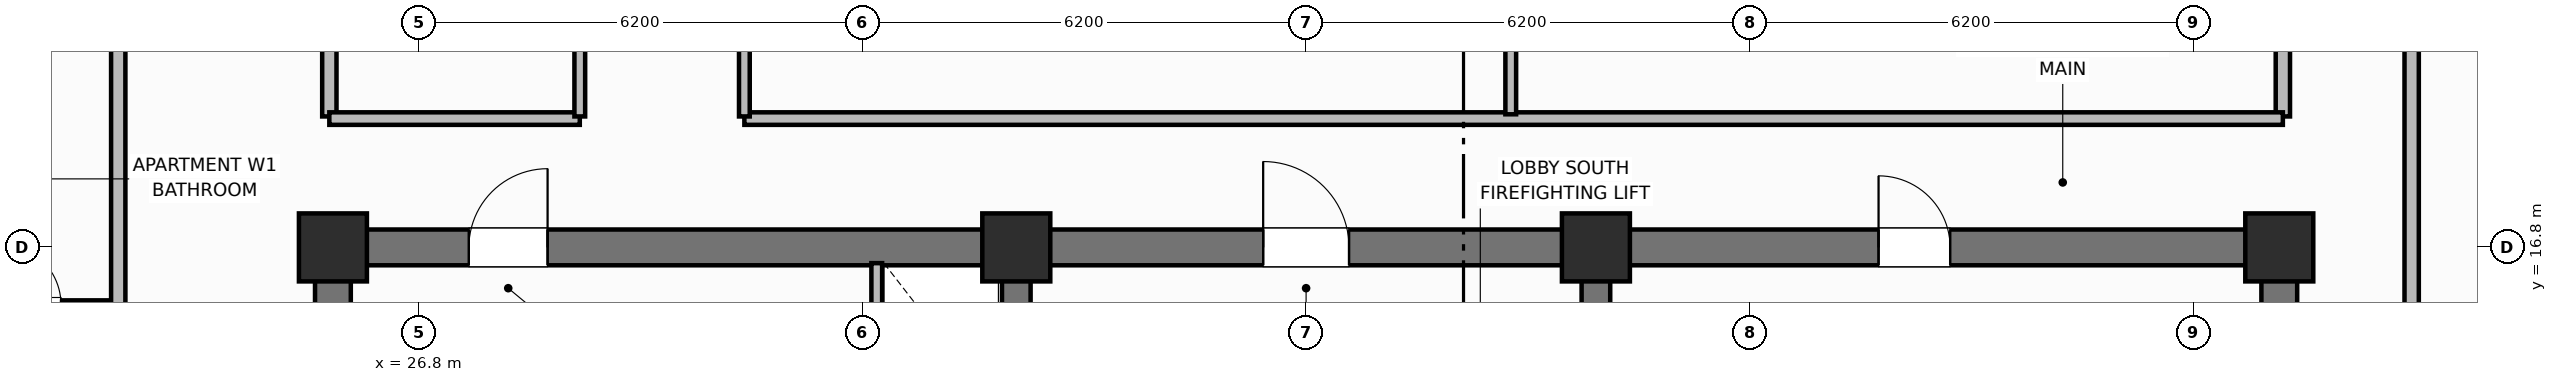
"""IFC4 building model, lengths in metres.
Left out: names, types, materials, properties, quantities, classifications, styles, units other than length and angle.
Written with IfcOpenShell. Run it as: python <this file> out.ifc"""

import sys

from ifc_helpers import new_model, si_unit, direction, frame, frame_2d, origin, origin_2d, place, context, subcontext, project, spatial, rectangle, extrude, element, fill, save


model = new_model("IFC4")
c1 = context("Model", 3, precision=1e-05, world=origin(), true_north=direction((0.0, 1.0)))
c2 = subcontext(c1, "Body", "Model", "MODEL_VIEW")
j1 = project(units=[si_unit("LENGTHUNIT", "METRE"), si_unit("PLANEANGLEUNIT", "RADIAN")], contexts=[c1])
p1 = place(None, origin())
s1 = spatial("IfcSite", under=j1, at=p1, CompositionType="ELEMENT")
p2 = place(p1, origin())
s2 = spatial("IfcBuilding", under=s1, at=p2, CompositionType="ELEMENT")
p3 = place(p2, frame((0.0, 0.0, 177.4)))
s3 = spatial("IfcBuildingStorey", under=s2, at=p3, CompositionType="ELEMENT", Elevation=177.4)
for number, where, z_axis, x_axis in (
    (1, (25.6, 10.85, 0.0), (0.0, 0.0, 1.0), (0.0, 1.0, 0.0)),
    (2, (52.8, 10.85, 0.0), (0.0, 0.0, 1.0), (0.0, 1.0, 0.0)),
):
    element("IfcWall", number, at=place(p3, frame(where, z_axis=z_axis, x_axis=x_axis)), inside=s3, PredefinedType="SHEAR", context=c2, shape_type="SweptSolid", body=[
        extrude(rectangle(XDim=5.7, YDim=0.5, at=frame_2d((2.85, 0.0))), origin(), (0.0, 0.0, 1.0), 3.7),
    ])
p4 = place(p3, frame((25.6, 16.8, 0.0), z_axis=(0.0, 0.0, 1.0), x_axis=(1.0, 0.0, 0.0)))
e3 = element("IfcWall", 3, at=p4, inside=s3, PredefinedType="SHEAR", context=c2, shape_type="SweptSolid", body=[
    extrude(rectangle(XDim=27.2, YDim=0.5, at=frame_2d((13.6, 0.0))), origin(), (0.0, 0.0, 1.0), 3.7),
])
p5 = place(p4, frame((1.9, 0.0, 0.0)))
e4 = element("IfcOpeningElement", 4, at=p5, cuts=e3, PredefinedType="OPENING", context=c2, shape_type="SweptSolid", body=[
    extrude(rectangle(XDim=1.1, YDim=2.15, at=frame_2d((0.55, 1.075))), frame((0.0, 0.26, 0.0), z_axis=(0.0, -1.0, 0.0), x_axis=(1.0, 0.0, 0.0)), (0.0, 0.0, 1.0), 0.52),
])
p6 = place(p4, frame((13.0, 0.0, 0.0)))
e5 = element("IfcOpeningElement", 5, at=p6, cuts=e3, PredefinedType="OPENING", context=c2, shape_type="SweptSolid", body=[
    extrude(rectangle(XDim=1.2, YDim=2.15, at=frame_2d((0.6, 1.075))), frame((0.0, 0.26, 0.0), z_axis=(0.0, -1.0, 0.0), x_axis=(1.0, 0.0, 0.0)), (0.0, 0.0, 1.0), 0.52),
])
p7 = place(p4, frame((21.6, 0.0, 0.0)))
e6 = element("IfcOpeningElement", 6, at=p7, cuts=e3, PredefinedType="OPENING", context=c2, shape_type="SweptSolid", body=[
    extrude(rectangle(XDim=1.0, YDim=2.15, at=frame_2d((0.5, 1.075))), frame((0.0, 0.26, 0.0), z_axis=(0.0, -1.0, 0.0), x_axis=(1.0, 0.0, 0.0)), (0.0, 0.0, 1.0), 0.52),
])
for number, where, z_axis, x_axis in (
    (7, (35.15, 10.85, 0.0), (0.0, 0.0, 1.0), (0.0, 1.0, 0.0)),
    (8, (43.25, 10.85, 0.0), (0.0, 0.0, 1.0), (0.0, 1.0, 0.0)),
):
    element("IfcWall", number, at=place(p3, frame(where, z_axis=z_axis, x_axis=x_axis)), inside=s3, PredefinedType="SHEAR", context=c2, shape_type="SweptSolid", body=[
        extrude(rectangle(XDim=5.7, YDim=0.4, at=frame_2d((2.85, 0.0))), origin(), (0.0, 0.0, 1.0), 3.7),
    ])
for number, where, z_axis, x_axis in (
    (9, (25.6, 16.8, 0.0), (0.0, 0.0, 1.0), (1.0, 0.0, 0.0)),
    (10, (35.15, 16.8, 0.0), (0.0, 0.0, 1.0), (1.0, 0.0, 0.0)),
    (11, (43.25, 16.8, 0.0), (0.0, 0.0, 1.0), (1.0, 0.0, 0.0)),
    (12, (52.8, 16.8, 0.0), (0.0, 0.0, 1.0), (1.0, 0.0, 0.0)),
):
    element("IfcColumn", number, at=place(p3, frame(where, z_axis=z_axis, x_axis=x_axis)), inside=s3, PredefinedType="COLUMN", context=c2, shape_type="SweptSolid", body=[
        extrude(rectangle(XDim=0.95, YDim=0.95, at=origin_2d()), origin(), (0.0, 0.0, 1.0), 3.7),
    ])
p8 = place(p3, frame((33.2, 14.5, 0.0), z_axis=(0.0, 0.0, 1.0), x_axis=(0.0, 1.0, 0.0)))
e13 = element("IfcWall", 13, at=p8, inside=s3, PredefinedType="PARTITIONING", context=c2, shape_type="SweptSolid", body=[
    extrude(rectangle(XDim=2.08, YDim=0.15, at=frame_2d((1.04, 0.0))), origin(), (0.0, 0.0, 1.0), 2.55),
])
p9 = place(p8, frame((0.55, 0.0, 0.0)))
e14 = element("IfcOpeningElement", 14, at=p9, cuts=e13, PredefinedType="OPENING", context=c2, shape_type="SweptSolid", body=[
    extrude(rectangle(XDim=0.85, YDim=2.05, at=frame_2d((0.425, 1.025))), frame((0.0, 0.085, 0.0), z_axis=(0.0, -1.0, 0.0), x_axis=(1.0, 0.0, 0.0)), (0.0, 0.0, 1.0), 0.17),
])
for number, where, z_axis, x_axis in (
    (15, (25.55, 18.63, 0.0), (0.0, 0.0, 1.0), (0.0, 1.0, 0.0)),
    (16, (52.85, 18.63, 0.0), (0.0, 0.0, 1.0), (0.0, 1.0, 0.0)),
):
    element("IfcWall", number, at=place(p3, frame(where, z_axis=z_axis, x_axis=x_axis)), inside=s3, PredefinedType="PARTITIONING", context=c2, shape_type="SweptSolid", body=[
        extrude(rectangle(XDim=19.14, YDim=0.2, at=frame_2d((9.57, 0.0))), origin(), (0.0, 0.0, 1.0), 2.55),
    ])
p10 = place(p3, frame((25.55, 18.6, 0.0), z_axis=(0.0, 0.0, 1.0), x_axis=(1.0, 0.0, 0.0)))
e17 = element("IfcWall", 17, at=p10, inside=s3, PredefinedType="PARTITIONING", context=c2, shape_type="SweptSolid", body=[
    extrude(rectangle(XDim=3.5, YDim=0.175, at=frame_2d((1.75, 0.0))), origin(), (0.0, 0.0, 1.0), 2.55),
])
p11 = place(p3, frame((31.35, 18.6, 0.0), z_axis=(0.0, 0.0, 1.0), x_axis=(1.0, 0.0, 0.0)))
e18 = element("IfcWall", 18, at=p11, inside=s3, PredefinedType="PARTITIONING", context=c2, shape_type="SweptSolid", body=[
    extrude(rectangle(XDim=21.5, YDim=0.175, at=frame_2d((10.75, 0.0))), origin(), (0.0, 0.0, 1.0), 2.55),
])
p12 = place(p3, frame((42.06, 18.66, 0.0), z_axis=(0.0, 0.0, 1.0), x_axis=(0.0, 1.0, 0.0)))
e19 = element("IfcWall", 19, at=p12, inside=s3, PredefinedType="PARTITIONING", context=c2, shape_type="SweptSolid", body=[
    extrude(rectangle(XDim=19.08, YDim=0.15, at=frame_2d((9.54, 0.0))), origin(), (0.0, 0.0, 1.0), 2.55),
])
p13 = place(p12, frame((6.5, 0.0, 0.0)))
e20 = element("IfcOpeningElement", 20, at=p13, cuts=e19, PredefinedType="OPENING", context=c2, shape_type="SweptSolid", body=[
    extrude(rectangle(XDim=1.0, YDim=2.15, at=frame_2d((0.5, 1.075))), frame((0.0, 0.085, 0.0), z_axis=(0.0, -1.0, 0.0), x_axis=(1.0, 0.0, 0.0)), (0.0, 0.0, 1.0), 0.17),
])
p14 = place(p3, frame((29.05, 18.63, 0.0), z_axis=(0.0, 0.0, 1.0), x_axis=(0.0, 1.0, 0.0)))
e21 = element("IfcWall", 21, at=p14, inside=s3, PredefinedType="PARTITIONING", context=c2, shape_type="SweptSolid", body=[
    extrude(rectangle(XDim=19.14, YDim=0.15, at=frame_2d((9.57, 0.0))), origin(), (0.0, 0.0, 1.0), 2.55),
])
p15 = place(p14, frame((5.5, 0.0, 0.0)))
e22 = element("IfcOpeningElement", 22, at=p15, cuts=e21, PredefinedType="OPENING", context=c2, shape_type="SweptSolid", body=[
    extrude(rectangle(XDim=1.0, YDim=2.15, at=frame_2d((0.5, 1.075))), frame((0.0, 0.085, 0.0), z_axis=(0.0, -1.0, 0.0), x_axis=(1.0, 0.0, 0.0)), (0.0, 0.0, 1.0), 0.17),
])
p16 = place(p3, frame((31.35, 18.63, 0.0), z_axis=(0.0, 0.0, 1.0), x_axis=(0.0, 1.0, 0.0)))
e23 = element("IfcWall", 23, at=p16, inside=s3, PredefinedType="PARTITIONING", context=c2, shape_type="SweptSolid", body=[
    extrude(rectangle(XDim=19.14, YDim=0.15, at=frame_2d((9.57, 0.0))), origin(), (0.0, 0.0, 1.0), 2.55),
])
p17 = place(p16, frame((5.5, 0.0, 0.0)))
e24 = element("IfcOpeningElement", 24, at=p17, cuts=e23, PredefinedType="OPENING", context=c2, shape_type="SweptSolid", body=[
    extrude(rectangle(XDim=1.0, YDim=2.15, at=frame_2d((0.5, 1.075))), frame((0.0, 0.085, 0.0), z_axis=(0.0, -1.0, 0.0), x_axis=(1.0, 0.0, 0.0)), (0.0, 0.0, 1.0), 0.17),
])
p18 = place(p3, frame((20.35, 16.0, 0.0), z_axis=(0.0, 0.0, 1.0), x_axis=(1.0, 0.0, 0.0)))
e25 = element("IfcWall", 25, at=p18, inside=s3, PredefinedType="PARTITIONING", context=c2, shape_type="SweptSolid", body=[
    extrude(rectangle(XDim=2.25, YDim=0.12, at=frame_2d((1.125, 0.0))), origin(), (0.0, 0.0, 1.0), 2.55),
])
p19 = place(p18, frame((0.6, 0.0, 0.0)))
e26 = element("IfcOpeningElement", 26, at=p19, cuts=e25, PredefinedType="OPENING", context=c2, shape_type="SweptSolid", body=[
    extrude(rectangle(XDim=0.85, YDim=2.1, at=frame_2d((0.425, 1.05))), frame((0.0, 0.07, 0.0), z_axis=(0.0, -1.0, 0.0), x_axis=(1.0, 0.0, 0.0)), (0.0, 0.0, 1.0), 0.14),
])
p20 = place(p3, frame((22.6, 10.6, 0.0), z_axis=(0.0, 0.0, 1.0), x_axis=(0.0, 1.0, 0.0)))
e27 = element("IfcWall", 27, at=p20, inside=s3, PredefinedType="PARTITIONING", context=c2, shape_type="SweptSolid", body=[
    extrude(rectangle(XDim=35.2, YDim=0.2, at=frame_2d((17.6, 0.0))), origin(), (0.0, 0.0, 1.0), 2.55),
])
p21 = place(p20, frame((2.65, 0.0, 0.0)))
e28 = element("IfcOpeningElement", 28, at=p21, cuts=e27, PredefinedType="OPENING", context=c2, shape_type="SweptSolid", body=[
    extrude(rectangle(XDim=1.0, YDim=2.15, at=frame_2d((0.5, 1.075))), frame((0.0, 0.11, 0.0), z_axis=(0.0, -1.0, 0.0), x_axis=(1.0, 0.0, 0.0)), (0.0, 0.0, 1.0), 0.22),
])
p22 = place(p20, frame((22.75, 0.0, 0.0)))
e29 = element("IfcOpeningElement", 29, at=p22, cuts=e27, PredefinedType="OPENING", context=c2, shape_type="SweptSolid", body=[
    extrude(rectangle(XDim=1.0, YDim=2.15, at=frame_2d((0.5, 1.075))), frame((0.0, 0.11, 0.0), z_axis=(0.0, -1.0, 0.0), x_axis=(1.0, 0.0, 0.0)), (0.0, 0.0, 1.0), 0.22),
])
p23 = place(p3, frame((54.65, 10.6, 0.0), z_axis=(0.0, 0.0, 1.0), x_axis=(0.0, 1.0, 0.0)))
e30 = element("IfcWall", 30, at=p23, inside=s3, PredefinedType="PARTITIONING", context=c2, shape_type="SweptSolid", body=[
    extrude(rectangle(XDim=35.2, YDim=0.2, at=frame_2d((17.6, 0.0))), origin(), (0.0, 0.0, 1.0), 2.55),
])
p24 = place(p23, frame((2.65, 0.0, 0.0)))
e31 = element("IfcOpeningElement", 31, at=p24, cuts=e30, PredefinedType="OPENING", context=c2, shape_type="SweptSolid", body=[
    extrude(rectangle(XDim=1.0, YDim=2.15, at=frame_2d((0.5, 1.075))), frame((0.0, 0.11, 0.0), z_axis=(0.0, -1.0, 0.0), x_axis=(1.0, 0.0, 0.0)), (0.0, 0.0, 1.0), 0.22),
])
p25 = place(p23, frame((11.352, 0.0, 0.0)))
e32 = element("IfcOpeningElement", 32, at=p25, cuts=e30, PredefinedType="OPENING", context=c2, shape_type="SweptSolid", body=[
    extrude(rectangle(XDim=1.0, YDim=2.15, at=frame_2d((0.5, 1.075))), frame((0.0, 0.11, 0.0), z_axis=(0.0, -1.0, 0.0), x_axis=(1.0, 0.0, 0.0)), (0.0, 0.0, 1.0), 0.22),
])
p26 = place(p23, frame((21.37, 0.0, 0.0)))
e33 = element("IfcOpeningElement", 33, at=p26, cuts=e30, PredefinedType="OPENING", context=c2, shape_type="SweptSolid", body=[
    extrude(rectangle(XDim=1.0, YDim=2.15, at=frame_2d((0.5, 1.075))), frame((0.0, 0.11, 0.0), z_axis=(0.0, -1.0, 0.0), x_axis=(1.0, 0.0, 0.0)), (0.0, 0.0, 1.0), 0.22),
])
p27 = place(p23, frame((27.302, 0.0, 0.0)))
e34 = element("IfcOpeningElement", 34, at=p27, cuts=e30, PredefinedType="OPENING", context=c2, shape_type="SweptSolid", body=[
    extrude(rectangle(XDim=1.0, YDim=2.15, at=frame_2d((0.5, 1.075))), frame((0.0, 0.11, 0.0), z_axis=(0.0, -1.0, 0.0), x_axis=(1.0, 0.0, 0.0)), (0.0, 0.0, 1.0), 0.22),
])
p28 = place(p19, origin())
e35 = element("IfcDoor", 35, at=p28, inside=s3, OperationType="SINGLE_SWING_LEFT", PredefinedType="DOOR", context=c2, shape_type="SweptSolid", body=[
    extrude(rectangle(XDim=0.85, YDim=2.1, at=frame_2d((0.425, 1.05))), frame((0.0, 0.025, 0.0), z_axis=(0.0, -1.0, 0.0), x_axis=(1.0, 0.0, 0.0)), (0.0, 0.0, 1.0), 0.05),
])
fill(e26, e35)
p29 = place(p5, origin())
e36 = element("IfcDoor", 36, at=p29, inside=s3, OperationType="SINGLE_SWING_RIGHT", PredefinedType="DOOR", context=c2, shape_type="SweptSolid", body=[
    extrude(rectangle(XDim=1.1, YDim=2.15, at=frame_2d((0.55, 1.075))), frame((0.0, 0.025, 0.0), z_axis=(0.0, -1.0, 0.0), x_axis=(1.0, 0.0, 0.0)), (0.0, 0.0, 1.0), 0.05),
])
fill(e4, e36)
p30 = place(p6, origin())
e37 = element("IfcDoor", 37, at=p30, inside=s3, OperationType="SINGLE_SWING_LEFT", PredefinedType="DOOR", context=c2, shape_type="SweptSolid", body=[
    extrude(rectangle(XDim=1.2, YDim=2.15, at=frame_2d((0.6, 1.075))), frame((0.0, 0.025, 0.0), z_axis=(0.0, -1.0, 0.0), x_axis=(1.0, 0.0, 0.0)), (0.0, 0.0, 1.0), 0.05),
])
fill(e5, e37)
p31 = place(p7, origin())
e38 = element("IfcDoor", 38, at=p31, inside=s3, OperationType="SINGLE_SWING_LEFT", PredefinedType="DOOR", context=c2, shape_type="SweptSolid", body=[
    extrude(rectangle(XDim=1.0, YDim=2.15, at=frame_2d((0.5, 1.075))), frame((0.0, 0.025, 0.0), z_axis=(0.0, -1.0, 0.0), x_axis=(1.0, 0.0, 0.0)), (0.0, 0.0, 1.0), 0.05),
])
fill(e6, e38)
save(model, sys.argv[1])
